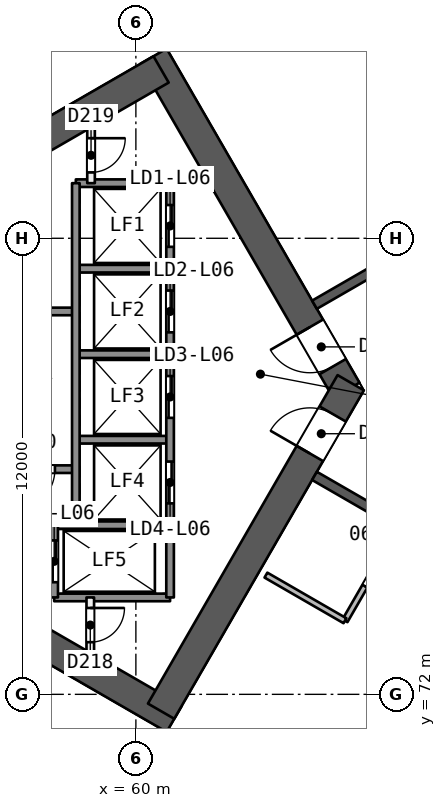
"""IFC4 building model, lengths in metres.
Left out: names, types, materials, properties, quantities, classifications, styles, units other than length and angle.
Written with IfcOpenShell. Run it as: python <this file> out.ifc"""

import sys

from ifc_helpers import new_model, si_unit, direction, frame, frame_2d, origin, place, context, subcontext, project, spatial, rectangle, extrude, element, fill, save


model = new_model("IFC4")
c1 = context("Model", 3, precision=1e-05, world=origin(), true_north=direction((0.0, 1.0)))
c2 = subcontext(c1, "Body", "Model", "MODEL_VIEW")
j1 = project(units=[si_unit("LENGTHUNIT", "METRE"), si_unit("PLANEANGLEUNIT", "RADIAN")], contexts=[c1])
p1 = place(None, origin())
s1 = spatial("IfcSite", under=j1, at=p1, CompositionType="ELEMENT")
p2 = place(p1, origin())
s2 = spatial("IfcBuilding", under=s1, at=p2, CompositionType="ELEMENT")
p3 = place(p2, frame((0.0, 0.0, 33.7)))
s3 = spatial("IfcBuildingStorey", under=s2, at=p3, CompositionType="ELEMENT", Elevation=33.7)
p4 = place(p3, frame((65.538, 80.0, 0.0), z_axis=(0.0, 0.0, 1.0), x_axis=(-0.49999662545, 0.866027352073, 0.0)))
e1 = element("IfcWall", 1, at=p4, inside=s3, PredefinedType="SHEAR", context=c2, shape_type="SweptSolid", body=[
    extrude(rectangle(XDim=10.149, YDim=0.8, at=frame_2d((5.074, 0.0))), origin(), (0.0, 0.0, 1.0), 3.7),
])
p5 = place(p4, frame((0.719, 0.0, 0.0)))
e2 = element("IfcOpeningElement", 2, at=p5, cuts=e1, PredefinedType="OPENING", context=c2, shape_type="SweptSolid", body=[
    extrude(rectangle(XDim=1.2, YDim=2.1, at=frame_2d((0.6, 1.05))), frame((0.0, 0.411, 0.0), z_axis=(0.0, -1.0, 0.0), x_axis=(1.0, 0.0, 0.0)), (0.0, 0.0, 1.0), 0.821),
])
p6 = place(p3, frame((60.664, 88.443, 0.0), z_axis=(0.0, 0.0, 1.0), x_axis=(-0.866029478545, -0.499992942241, 0.0)))
e3 = element("IfcWall", 3, at=p6, inside=s3, PredefinedType="SHEAR", context=c2, shape_type="SweptSolid", body=[
    extrude(rectangle(XDim=13.933, YDim=0.8, at=frame_2d((6.967, 0.0))), origin(), (0.0, 0.0, 1.0), 3.7),
])
p7 = place(p3, frame((48.797, 78.408, 0.0), z_axis=(0.0, 0.0, 1.0), x_axis=(0.866032504327, -0.499987701298, 0.0)))
e4 = element("IfcWall", 4, at=p7, inside=s3, PredefinedType="SHEAR", context=c2, shape_type="SweptSolid", body=[
    extrude(rectangle(XDim=14.102, YDim=0.8, at=frame_2d((7.051, 0.0))), origin(), (0.0, 0.0, 1.0), 3.7),
])
p8 = place(p3, frame((60.664, 71.557, 0.0), z_axis=(0.0, 0.0, 1.0), x_axis=(0.50000409368, 0.866023040284, 0.0)))
e5 = element("IfcWall", 5, at=p8, inside=s3, PredefinedType="SHEAR", context=c2, shape_type="SweptSolid", body=[
    extrude(rectangle(XDim=9.98, YDim=0.8, at=frame_2d((4.99, 0.0))), origin(), (0.0, 0.0, 1.0), 3.7),
])
p9 = place(p8, frame((7.83, 0.0, 0.0)))
e6 = element("IfcOpeningElement", 6, at=p9, cuts=e5, PredefinedType="OPENING", context=c2, shape_type="SweptSolid", body=[
    extrude(rectangle(XDim=1.2, YDim=2.1, at=frame_2d((0.6, 1.05))), frame((0.0, 0.411, 0.0), z_axis=(0.0, -1.0, 0.0), x_axis=(1.0, 0.0, 0.0)), (0.0, 0.0, 1.0), 0.821),
])
p10 = place(p3, frame((78.2, 90.046, 0.0), z_axis=(0.0, 0.0, 1.0), x_axis=(-0.866026492143, -0.499998114903, 0.0)))
e7 = element("IfcWall", 7, at=p10, inside=s3, PredefinedType="SHEAR", context=c2, shape_type="SweptSolid", body=[
    extrude(rectangle(XDim=15.588, YDim=0.25, at=frame_2d((7.794, 0.0))), origin(), (0.0, 0.0, 1.0), 3.2),
])
p11 = place(p10, frame((2.618, 0.0, 0.0)))
e8 = element("IfcOpeningElement", 8, at=p11, cuts=e7, PredefinedType="OPENING", context=c2, shape_type="SweptSolid", body=[
    extrude(rectangle(XDim=1.0, YDim=2.1, at=frame_2d((0.5, 1.05))), frame((0.0, 0.135, 0.0), z_axis=(0.0, -1.0, 0.0), x_axis=(1.0, 0.0, 0.0)), (0.0, 0.0, 1.0), 0.271),
])
p12 = place(p10, frame((9.218, 0.0, 0.0)))
e9 = element("IfcOpeningElement", 9, at=p12, cuts=e7, PredefinedType="OPENING", context=c2, shape_type="SweptSolid", body=[
    extrude(rectangle(XDim=1.0, YDim=2.1, at=frame_2d((0.5, 1.05))), frame((0.0, 0.135, 0.0), z_axis=(0.0, -1.0, 0.0), x_axis=(1.0, 0.0, 0.0)), (0.0, 0.0, 1.0), 0.271),
])
p13 = place(p10, frame((12.594, 0.0, 0.0)))
e10 = element("IfcOpeningElement", 10, at=p13, cuts=e7, PredefinedType="OPENING", context=c2, shape_type="SweptSolid", body=[
    extrude(rectangle(XDim=1.0, YDim=2.1, at=frame_2d((0.5, 1.05))), frame((0.0, 0.135, 0.0), z_axis=(0.0, -1.0, 0.0), x_axis=(1.0, 0.0, 0.0)), (0.0, 0.0, 1.0), 0.271),
])
p14 = place(p3, frame((64.7, 77.748, 0.0), z_axis=(0.0, 0.0, 1.0), x_axis=(0.866026492143, -0.499998114903, 0.0)))
e11 = element("IfcWall", 11, at=p14, inside=s3, PredefinedType="SHEAR", context=c2, shape_type="SweptSolid", body=[
    extrude(rectangle(XDim=15.588, YDim=0.25, at=frame_2d((7.794, 0.0))), origin(), (0.0, 0.0, 1.0), 3.2),
])
p15 = place(p14, frame((3.138, 0.0, 0.0)))
e12 = element("IfcOpeningElement", 12, at=p15, cuts=e11, PredefinedType="OPENING", context=c2, shape_type="SweptSolid", body=[
    extrude(rectangle(XDim=1.0, YDim=2.1, at=frame_2d((0.5, 1.05))), frame((0.0, 0.135, 0.0), z_axis=(0.0, -1.0, 0.0), x_axis=(1.0, 0.0, 0.0)), (0.0, 0.0, 1.0), 0.271),
])
p16 = place(p14, frame((9.006, 0.0, 0.0)))
e13 = element("IfcOpeningElement", 13, at=p16, cuts=e11, PredefinedType="OPENING", context=c2, shape_type="SweptSolid", body=[
    extrude(rectangle(XDim=1.1, YDim=2.1, at=frame_2d((0.55, 1.05))), frame((0.0, 0.135, 0.0), z_axis=(0.0, -1.0, 0.0), x_axis=(1.0, 0.0, 0.0)), (0.0, 0.0, 1.0), 0.271),
])
p17 = place(p14, frame((11.762, 0.0, 0.0)))
e14 = element("IfcOpeningElement", 14, at=p17, cuts=e11, PredefinedType="OPENING", context=c2, shape_type="SweptSolid", body=[
    extrude(rectangle(XDim=1.0, YDim=2.1, at=frame_2d((0.5, 1.05))), frame((0.0, 0.135, 0.0), z_axis=(0.0, -1.0, 0.0), x_axis=(1.0, 0.0, 0.0)), (0.0, 0.0, 1.0), 0.271),
])
for number, where, z_axis, x_axis in (
    (15, (65.712, 99.205, 0.0), (0.0, 0.0, 1.0), (0.5, -0.866, 0.0)),
    (16, (61.932, 97.023, 0.0), (0.0, 0.0, 1.0), (0.5, -0.866, 0.0)),
):
    element("IfcWall", number, at=place(p3, frame(where, z_axis=z_axis, x_axis=x_axis)), inside=s3, PredefinedType="PARTITIONING", context=c2, shape_type="SweptSolid", body=[
        extrude(rectangle(XDim=14.176, YDim=0.2, at=frame_2d((7.088, 0.0))), origin(), (0.0, 0.0, 1.0), 3.2),
    ])
p18 = place(p3, frame((66.952, 76.448, 0.0), z_axis=(0.0, 0.0, 1.0), x_axis=(-0.499987231761, -0.866032775405, 0.0)))
e17 = element("IfcWall", 17, at=p18, inside=s3, PredefinedType="PARTITIONING", context=c2, shape_type="SweptSolid", body=[
    extrude(rectangle(XDim=2.9, YDim=0.15, at=frame_2d((1.45, 0.0))), origin(), (0.0, 0.0, 1.0), 3.2),
])
p19 = place(p18, frame((1.05, 0.0, 0.0)))
e18 = element("IfcOpeningElement", 18, at=p19, cuts=e17, PredefinedType="OPENING", context=c2, shape_type="SweptSolid", body=[
    extrude(rectangle(XDim=0.8, YDim=2.1, at=frame_2d((0.4, 1.05))), frame((0.0, 0.085, 0.0), z_axis=(0.0, -1.0, 0.0), x_axis=(1.0, 0.0, 0.0)), (0.0, 0.0, 1.0), 0.171),
])
p20 = place(p3, frame((65.502, 73.937, 0.0), z_axis=(0.0, 0.0, 1.0), x_axis=(-0.865994240961, 0.500053971709, 0.0)))
e19 = element("IfcWall", 19, at=p20, inside=s3, PredefinedType="PARTITIONING", context=c2, shape_type="SweptSolid", body=[
    extrude(rectangle(XDim=2.401, YDim=0.15, at=frame_2d((1.201, 0.0))), origin(), (0.0, 0.0, 1.0), 3.2),
])
p21 = place(p3, frame((61.662, 63.133, 0.0), z_axis=(0.0, 0.0, 1.0), x_axis=(0.499999157533, 0.866025890183, 0.0)))
e20 = element("IfcWall", 20, at=p21, inside=s3, PredefinedType="PARTITIONING", context=c2, shape_type="SweptSolid", body=[
    extrude(rectangle(XDim=11.176, YDim=0.2, at=frame_2d((5.588, 0.0))), origin(), (0.0, 0.0, 1.0), 3.2),
])
p22 = place(p3, frame((37.61, 83.152, 0.0), z_axis=(0.0, 0.0, 1.0), x_axis=(0.866024438126, 0.500001672566, 0.0)))
e21 = element("IfcWall", 21, at=p22, inside=s3, PredefinedType="SOLIDWALL", context=c2, shape_type="SweptSolid", body=[
    extrude(rectangle(XDim=61.61, YDim=0.3, at=frame_2d((30.805, 0.0))), origin(), (0.0, 0.0, 1.0), 3.2),
])
p23 = place(p22, frame((34.281, 0.0, 0.0)))
e22 = element("IfcOpeningElement", 22, at=p23, cuts=e21, PredefinedType="OPENING", context=c2, shape_type="SweptSolid", body=[
    extrude(rectangle(XDim=2.4, YDim=2.4, at=frame_2d((1.2, 1.2))), frame((0.0, 0.161, 0.0), z_axis=(0.0, -1.0, 0.0), x_axis=(1.0, 0.0, 0.0)), (0.0, 0.0, 1.0), 0.321),
])
p24 = place(p22, frame((47.767, 0.0, 0.0)))
e23 = element("IfcOpeningElement", 23, at=p24, cuts=e21, PredefinedType="OPENING", context=c2, shape_type="SweptSolid", body=[
    extrude(rectangle(XDim=2.4, YDim=2.4, at=frame_2d((1.2, 1.2))), frame((0.0, 0.161, 0.0), z_axis=(0.0, -1.0, 0.0), x_axis=(1.0, 0.0, 0.0)), (0.0, 0.0, 1.0), 0.321),
])
p25 = place(p22, frame((24.305, 0.0, 0.0)))
e24 = element("IfcOpeningElement", 24, at=p25, cuts=e21, PredefinedType="OPENING", context=c2, shape_type="SweptSolid", body=[
    extrude(rectangle(XDim=2.4, YDim=2.4, at=frame_2d((1.2, 1.2))), frame((0.0, 0.161, 0.0), z_axis=(0.0, -1.0, 0.0), x_axis=(1.0, 0.0, 0.0)), (0.0, 0.0, 1.0), 0.321),
])
p26 = place(p22, frame((11.402, 0.0, 0.0)))
e25 = element("IfcOpeningElement", 25, at=p26, cuts=e21, PredefinedType="OPENING", context=c2, shape_type="SweptSolid", body=[
    extrude(rectangle(XDim=2.4, YDim=2.4, at=frame_2d((1.2, 1.2))), frame((0.0, 0.161, 0.0), z_axis=(0.0, -1.0, 0.0), x_axis=(1.0, 0.0, 0.0)), (0.0, 0.0, 1.0), 0.321),
])
p27 = place(p22, frame((28.981, 0.0, 0.0)))
e26 = element("IfcOpeningElement", 26, at=p27, cuts=e21, PredefinedType="OPENING", context=c2, shape_type="SweptSolid", body=[
    extrude(rectangle(XDim=2.4, YDim=2.4, at=frame_2d((1.2, 1.2))), frame((0.0, 0.161, 0.0), z_axis=(0.0, -1.0, 0.0), x_axis=(1.0, 0.0, 0.0)), (0.0, 0.0, 1.0), 0.321),
])
p28 = place(p3, frame((90.965, 46.043, 0.0), z_axis=(0.0, 0.0, 1.0), x_axis=(-0.866024438126, 0.500001672566, 0.0)))
e27 = element("IfcWall", 27, at=p28, inside=s3, PredefinedType="SOLIDWALL", context=c2, shape_type="SweptSolid", body=[
    extrude(rectangle(XDim=61.61, YDim=0.3, at=frame_2d((30.805, 0.0))), origin(), (0.0, 0.0, 1.0), 3.2),
])
p29 = place(p28, frame((29.293, 0.0, 0.0)))
e28 = element("IfcOpeningElement", 28, at=p29, cuts=e27, PredefinedType="OPENING", context=c2, shape_type="SweptSolid", body=[
    extrude(rectangle(XDim=2.4, YDim=2.4, at=frame_2d((1.2, 1.2))), frame((0.0, 0.161, 0.0), z_axis=(0.0, -1.0, 0.0), x_axis=(1.0, 0.0, 0.0)), (0.0, 0.0, 1.0), 0.321),
])
p30 = place(p28, frame((46.61, 0.0, 0.0)))
e29 = element("IfcOpeningElement", 29, at=p30, cuts=e27, PredefinedType="OPENING", context=c2, shape_type="SweptSolid", body=[
    extrude(rectangle(XDim=2.4, YDim=2.4, at=frame_2d((1.2, 1.2))), frame((0.0, 0.161, 0.0), z_axis=(0.0, -1.0, 0.0), x_axis=(1.0, 0.0, 0.0)), (0.0, 0.0, 1.0), 0.321),
])
p31 = place(p28, frame((12.289, 0.0, 0.0)))
e30 = element("IfcOpeningElement", 30, at=p31, cuts=e27, PredefinedType="OPENING", context=c2, shape_type="SweptSolid", body=[
    extrude(rectangle(XDim=2.4, YDim=2.4, at=frame_2d((1.2, 1.2))), frame((0.0, 0.161, 0.0), z_axis=(0.0, -1.0, 0.0), x_axis=(1.0, 0.0, 0.0)), (0.0, 0.0, 1.0), 0.321),
])
for number, where, z_axis, x_axis in (
    (31, (60.9, 85.45, 0.0), (0.0, 0.0, 1.0), (-1.0, 0.0, 0.0)),
    (32, (60.9, 83.2, 0.0), (0.0, 0.0, 1.0), (-1.0, 0.0, 0.0)),
):
    element("IfcWall", number, at=place(p3, frame(where, z_axis=z_axis, x_axis=x_axis)), inside=s3, PredefinedType="SOLIDWALL", context=c2, shape_type="SweptSolid", body=[
        extrude(rectangle(XDim=2.48, YDim=0.2, at=frame_2d((1.24, 0.0))), origin(), (0.0, 0.0, 1.0), 3.2),
    ])
p32 = place(p3, frame((58.42, 82.075, 0.0), z_axis=(0.0, 0.0, 1.0), x_axis=(-1.0, 0.0, 0.0)))
e33 = element("IfcWall", 33, at=p32, inside=s3, PredefinedType="SOLIDWALL", context=c2, shape_type="SweptSolid", body=[
    extrude(rectangle(XDim=7.7, YDim=0.2, at=frame_2d((3.85, 0.0))), origin(), (0.0, 0.0, 1.0), 3.2),
])
for number, where, z_axis, x_axis in (
    (34, (60.9, 80.95, 0.0), (0.0, 0.0, 1.0), (-1.0, 0.0, 0.0)),
    (35, (60.9, 78.7, 0.0), (0.0, 0.0, 1.0), (-1.0, 0.0, 0.0)),
):
    element("IfcWall", number, at=place(p3, frame(where, z_axis=z_axis, x_axis=x_axis)), inside=s3, PredefinedType="SOLIDWALL", context=c2, shape_type="SweptSolid", body=[
        extrude(rectangle(XDim=2.48, YDim=0.2, at=frame_2d((1.24, 0.0))), origin(), (0.0, 0.0, 1.0), 3.2),
    ])
p33 = place(p3, frame((58.42, 77.925, 0.0), z_axis=(0.0, 0.0, 1.0), x_axis=(-1.0, 0.0, 0.0)))
e36 = element("IfcWall", 36, at=p33, inside=s3, PredefinedType="SOLIDWALL", context=c2, shape_type="SweptSolid", body=[
    extrude(rectangle(XDim=7.7, YDim=0.2, at=frame_2d((3.85, 0.0))), origin(), (0.0, 0.0, 1.0), 3.2),
])
p34 = place(p33, frame((0.55, 0.0, 0.0)))
e37 = element("IfcOpeningElement", 37, at=p34, cuts=e36, PredefinedType="OPENING", context=c2, shape_type="SweptSolid", body=[
    extrude(rectangle(XDim=1.1, YDim=2.1, at=frame_2d((0.55, 1.05))), frame((0.0, 0.11, 0.0), z_axis=(0.0, -1.0, 0.0), x_axis=(1.0, 0.0, 0.0)), (0.0, 0.0, 1.0), 0.221),
])
for number, where, z_axis, x_axis in (
    (38, (60.9, 76.45, 0.0), (0.0, 0.0, 1.0), (-1.0, 0.0, 0.0)),
    (39, (60.9, 74.55, 0.0), (0.0, 0.0, 1.0), (-1.0, 0.0, 0.0)),
):
    element("IfcWall", number, at=place(p3, frame(where, z_axis=z_axis, x_axis=x_axis)), inside=s3, PredefinedType="SOLIDWALL", context=c2, shape_type="SweptSolid", body=[
        extrude(rectangle(XDim=3.05, YDim=0.2, at=frame_2d((1.525, 0.0))), origin(), (0.0, 0.0, 1.0), 3.2),
    ])
p35 = place(p3, frame((60.9, 85.45, 0.0), z_axis=(0.0, 0.0, 1.0), x_axis=(0.0, -1.0, 0.0)))
e40 = element("IfcWall", 40, at=p35, inside=s3, PredefinedType="SOLIDWALL", context=c2, shape_type="SweptSolid", body=[
    extrude(rectangle(XDim=10.9, YDim=0.2, at=frame_2d((5.45, 0.0))), origin(), (0.0, 0.0, 1.0), 3.2),
])
p36 = place(p35, frame((0.575, 0.0, 0.0)))
e41 = element("IfcOpeningElement", 41, at=p36, cuts=e40, PredefinedType="OPENING", context=c2, shape_type="SweptSolid", body=[
    extrude(rectangle(XDim=1.1, YDim=2.1, at=frame_2d((0.55, 1.05))), frame((0.0, 0.11, 0.0), z_axis=(0.0, -1.0, 0.0), x_axis=(1.0, 0.0, 0.0)), (0.0, 0.0, 1.0), 0.221),
])
p37 = place(p35, frame((2.825, 0.0, 0.0)))
e42 = element("IfcOpeningElement", 42, at=p37, cuts=e40, PredefinedType="OPENING", context=c2, shape_type="SweptSolid", body=[
    extrude(rectangle(XDim=1.1, YDim=2.1, at=frame_2d((0.55, 1.05))), frame((0.0, 0.11, 0.0), z_axis=(0.0, -1.0, 0.0), x_axis=(1.0, 0.0, 0.0)), (0.0, 0.0, 1.0), 0.221),
])
p38 = place(p35, frame((5.075, 0.0, 0.0)))
e43 = element("IfcOpeningElement", 43, at=p38, cuts=e40, PredefinedType="OPENING", context=c2, shape_type="SweptSolid", body=[
    extrude(rectangle(XDim=1.1, YDim=2.1, at=frame_2d((0.55, 1.05))), frame((0.0, 0.11, 0.0), z_axis=(0.0, -1.0, 0.0), x_axis=(1.0, 0.0, 0.0)), (0.0, 0.0, 1.0), 0.221),
])
p39 = place(p35, frame((7.325, 0.0, 0.0)))
e44 = element("IfcOpeningElement", 44, at=p39, cuts=e40, PredefinedType="OPENING", context=c2, shape_type="SweptSolid", body=[
    extrude(rectangle(XDim=1.1, YDim=2.1, at=frame_2d((0.55, 1.05))), frame((0.0, 0.11, 0.0), z_axis=(0.0, -1.0, 0.0), x_axis=(1.0, 0.0, 0.0)), (0.0, 0.0, 1.0), 0.221),
])
p40 = place(p3, frame((58.82, 86.917, 0.0), z_axis=(0.0, 0.0, 1.0), x_axis=(0.0, -1.0, 0.0)))
e45 = element("IfcWall", 45, at=p40, inside=s3, PredefinedType="PARTITIONING", context=c2, shape_type="SweptSolid", body=[
    extrude(rectangle(XDim=1.467, YDim=0.2, at=frame_2d((0.733, 0.0))), origin(), (0.0, 0.0, 1.0), 3.2),
])
p41 = place(p40, frame((0.283, 0.0, 0.0)))
e46 = element("IfcOpeningElement", 46, at=p41, cuts=e45, PredefinedType="OPENING", context=c2, shape_type="SweptSolid", body=[
    extrude(rectangle(XDim=0.9, YDim=2.1, at=frame_2d((0.45, 1.05))), frame((0.0, 0.11, 0.0), z_axis=(0.0, -1.0, 0.0), x_axis=(1.0, 0.0, 0.0)), (0.0, 0.0, 1.0), 0.221),
])
p42 = place(p3, frame((58.8, 74.55, 0.0), z_axis=(0.0, 0.0, 1.0), x_axis=(0.0, -1.0, 0.0)))
e47 = element("IfcWall", 47, at=p42, inside=s3, PredefinedType="PARTITIONING", context=c2, shape_type="SweptSolid", body=[
    extrude(rectangle(XDim=1.455, YDim=0.2, at=frame_2d((0.728, 0.0))), origin(), (0.0, 0.0, 1.0), 3.2),
])
p43 = place(p42, frame((0.278, 0.0, 0.0)))
e48 = element("IfcOpeningElement", 48, at=p43, cuts=e47, PredefinedType="OPENING", context=c2, shape_type="SweptSolid", body=[
    extrude(rectangle(XDim=0.9, YDim=2.1, at=frame_2d((0.45, 1.05))), frame((0.0, 0.11, 0.0), z_axis=(0.0, -1.0, 0.0), x_axis=(1.0, 0.0, 0.0)), (0.0, 0.0, 1.0), 0.221),
])
p44 = place(p3, frame((58.42, 85.45, 0.0), z_axis=(0.0, 0.0, 1.0), x_axis=(0.0, -1.0, 0.0)))
e49 = element("IfcWall", 49, at=p44, inside=s3, PredefinedType="SOLIDWALL", context=c2, shape_type="SweptSolid", body=[
    extrude(rectangle(XDim=9.0, YDim=0.2, at=frame_2d((4.5, 0.0))), origin(), (0.0, 0.0, 1.0), 3.2),
])
p45 = place(p3, frame((57.85, 76.45, 0.0), z_axis=(0.0, 0.0, 1.0), x_axis=(0.0, -1.0, 0.0)))
e50 = element("IfcWall", 50, at=p45, inside=s3, PredefinedType="SOLIDWALL", context=c2, shape_type="SweptSolid", body=[
    extrude(rectangle(XDim=1.9, YDim=0.2, at=frame_2d((0.95, 0.0))), origin(), (0.0, 0.0, 1.0), 3.2),
])
p46 = place(p45, frame((0.4, 0.0, 0.0)))
e51 = element("IfcOpeningElement", 51, at=p46, cuts=e50, PredefinedType="OPENING", context=c2, shape_type="SweptSolid", body=[
    extrude(rectangle(XDim=1.1, YDim=2.1, at=frame_2d((0.55, 1.05))), frame((0.0, 0.11, 0.0), z_axis=(0.0, -1.0, 0.0), x_axis=(1.0, 0.0, 0.0)), (0.0, 0.0, 1.0), 0.221),
])
p47 = place(p19, origin())
e52 = element("IfcDoor", 52, at=p47, inside=s3, OperationType="SINGLE_SWING_RIGHT", PredefinedType="NOTDEFINED", context=c2, shape_type="SweptSolid", body=[
    extrude(rectangle(XDim=0.8, YDim=2.1, at=frame_2d((0.4, 1.05))), frame((0.0, 0.025, 0.0), z_axis=(0.0, -1.0, 0.0), x_axis=(1.0, 0.0, 0.0)), (0.0, 0.0, 1.0), 0.05),
])
fill(e18, e52)
p48 = place(p5, origin())
e53 = element("IfcDoor", 53, at=p48, inside=s3, OperationType="SINGLE_SWING_RIGHT", PredefinedType="NOTDEFINED", context=c2, shape_type="SweptSolid", body=[
    extrude(rectangle(XDim=1.2, YDim=2.1, at=frame_2d((0.6, 1.05))), frame((0.0, 0.025, 0.0), z_axis=(0.0, -1.0, 0.0), x_axis=(1.0, 0.0, 0.0)), (0.0, 0.0, 1.0), 0.05),
])
fill(e2, e53)
p49 = place(p9, origin())
e54 = element("IfcDoor", 54, at=p49, inside=s3, OperationType="SINGLE_SWING_LEFT", PredefinedType="NOTDEFINED", context=c2, shape_type="SweptSolid", body=[
    extrude(rectangle(XDim=1.2, YDim=2.1, at=frame_2d((0.6, 1.05))), frame((0.0, 0.025, 0.0), z_axis=(0.0, -1.0, 0.0), x_axis=(1.0, 0.0, 0.0)), (0.0, 0.0, 1.0), 0.05),
])
fill(e6, e54)
p50 = place(p36, origin())
e55 = element("IfcDoor", 55, at=p50, inside=s3, OperationType="SLIDING_TO_RIGHT", PredefinedType="NOTDEFINED", context=c2, shape_type="SweptSolid", body=[
    extrude(rectangle(XDim=1.1, YDim=2.1, at=frame_2d((0.55, 1.05))), frame((0.0, 0.025, 0.0), z_axis=(0.0, -1.0, 0.0), x_axis=(1.0, 0.0, 0.0)), (0.0, 0.0, 1.0), 0.05),
])
fill(e41, e55)
p51 = place(p37, origin())
e56 = element("IfcDoor", 56, at=p51, inside=s3, OperationType="SLIDING_TO_LEFT", PredefinedType="NOTDEFINED", context=c2, shape_type="SweptSolid", body=[
    extrude(rectangle(XDim=1.1, YDim=2.1, at=frame_2d((0.55, 1.05))), frame((0.0, 0.025, 0.0), z_axis=(0.0, -1.0, 0.0), x_axis=(1.0, 0.0, 0.0)), (0.0, 0.0, 1.0), 0.05),
])
fill(e42, e56)
p52 = place(p38, origin())
e57 = element("IfcDoor", 57, at=p52, inside=s3, OperationType="SLIDING_TO_RIGHT", PredefinedType="NOTDEFINED", context=c2, shape_type="SweptSolid", body=[
    extrude(rectangle(XDim=1.1, YDim=2.1, at=frame_2d((0.55, 1.05))), frame((0.0, 0.025, 0.0), z_axis=(0.0, -1.0, 0.0), x_axis=(1.0, 0.0, 0.0)), (0.0, 0.0, 1.0), 0.05),
])
fill(e43, e57)
p53 = place(p39, origin())
e58 = element("IfcDoor", 58, at=p53, inside=s3, OperationType="SLIDING_TO_LEFT", PredefinedType="NOTDEFINED", context=c2, shape_type="SweptSolid", body=[
    extrude(rectangle(XDim=1.1, YDim=2.1, at=frame_2d((0.55, 1.05))), frame((0.0, 0.025, 0.0), z_axis=(0.0, -1.0, 0.0), x_axis=(1.0, 0.0, 0.0)), (0.0, 0.0, 1.0), 0.05),
])
fill(e44, e58)
p54 = place(p46, origin())
e59 = element("IfcDoor", 59, at=p54, inside=s3, OperationType="SLIDING_TO_RIGHT", PredefinedType="NOTDEFINED", context=c2, shape_type="SweptSolid", body=[
    extrude(rectangle(XDim=1.1, YDim=2.1, at=frame_2d((0.55, 1.05))), frame((0.0, 0.025, 0.0), z_axis=(0.0, -1.0, 0.0), x_axis=(1.0, 0.0, 0.0)), (0.0, 0.0, 1.0), 0.05),
])
fill(e51, e59)
p55 = place(p43, origin())
e60 = element("IfcDoor", 60, at=p55, inside=s3, OperationType="SINGLE_SWING_LEFT", PredefinedType="NOTDEFINED", context=c2, shape_type="SweptSolid", body=[
    extrude(rectangle(XDim=0.9, YDim=2.1, at=frame_2d((0.45, 1.05))), frame((0.0, 0.025, 0.0), z_axis=(0.0, -1.0, 0.0), x_axis=(1.0, 0.0, 0.0)), (0.0, 0.0, 1.0), 0.05),
])
fill(e48, e60)
p56 = place(p41, origin())
e61 = element("IfcDoor", 61, at=p56, inside=s3, OperationType="SINGLE_SWING_LEFT", PredefinedType="NOTDEFINED", context=c2, shape_type="SweptSolid", body=[
    extrude(rectangle(XDim=0.9, YDim=2.1, at=frame_2d((0.45, 1.05))), frame((0.0, 0.025, 0.0), z_axis=(0.0, -1.0, 0.0), x_axis=(1.0, 0.0, 0.0)), (0.0, 0.0, 1.0), 0.05),
])
fill(e46, e61)
p57 = place(p34, origin())
e62 = element("IfcDoor", 62, at=p57, inside=s3, OperationType="SINGLE_SWING_RIGHT", PredefinedType="NOTDEFINED", context=c2, shape_type="SweptSolid", body=[
    extrude(rectangle(XDim=1.1, YDim=2.1, at=frame_2d((0.55, 1.05))), frame((0.0, 0.025, 0.0), z_axis=(0.0, -1.0, 0.0), x_axis=(1.0, 0.0, 0.0)), (0.0, 0.0, 1.0), 0.05),
])
fill(e37, e62)
save(model, sys.argv[1])
